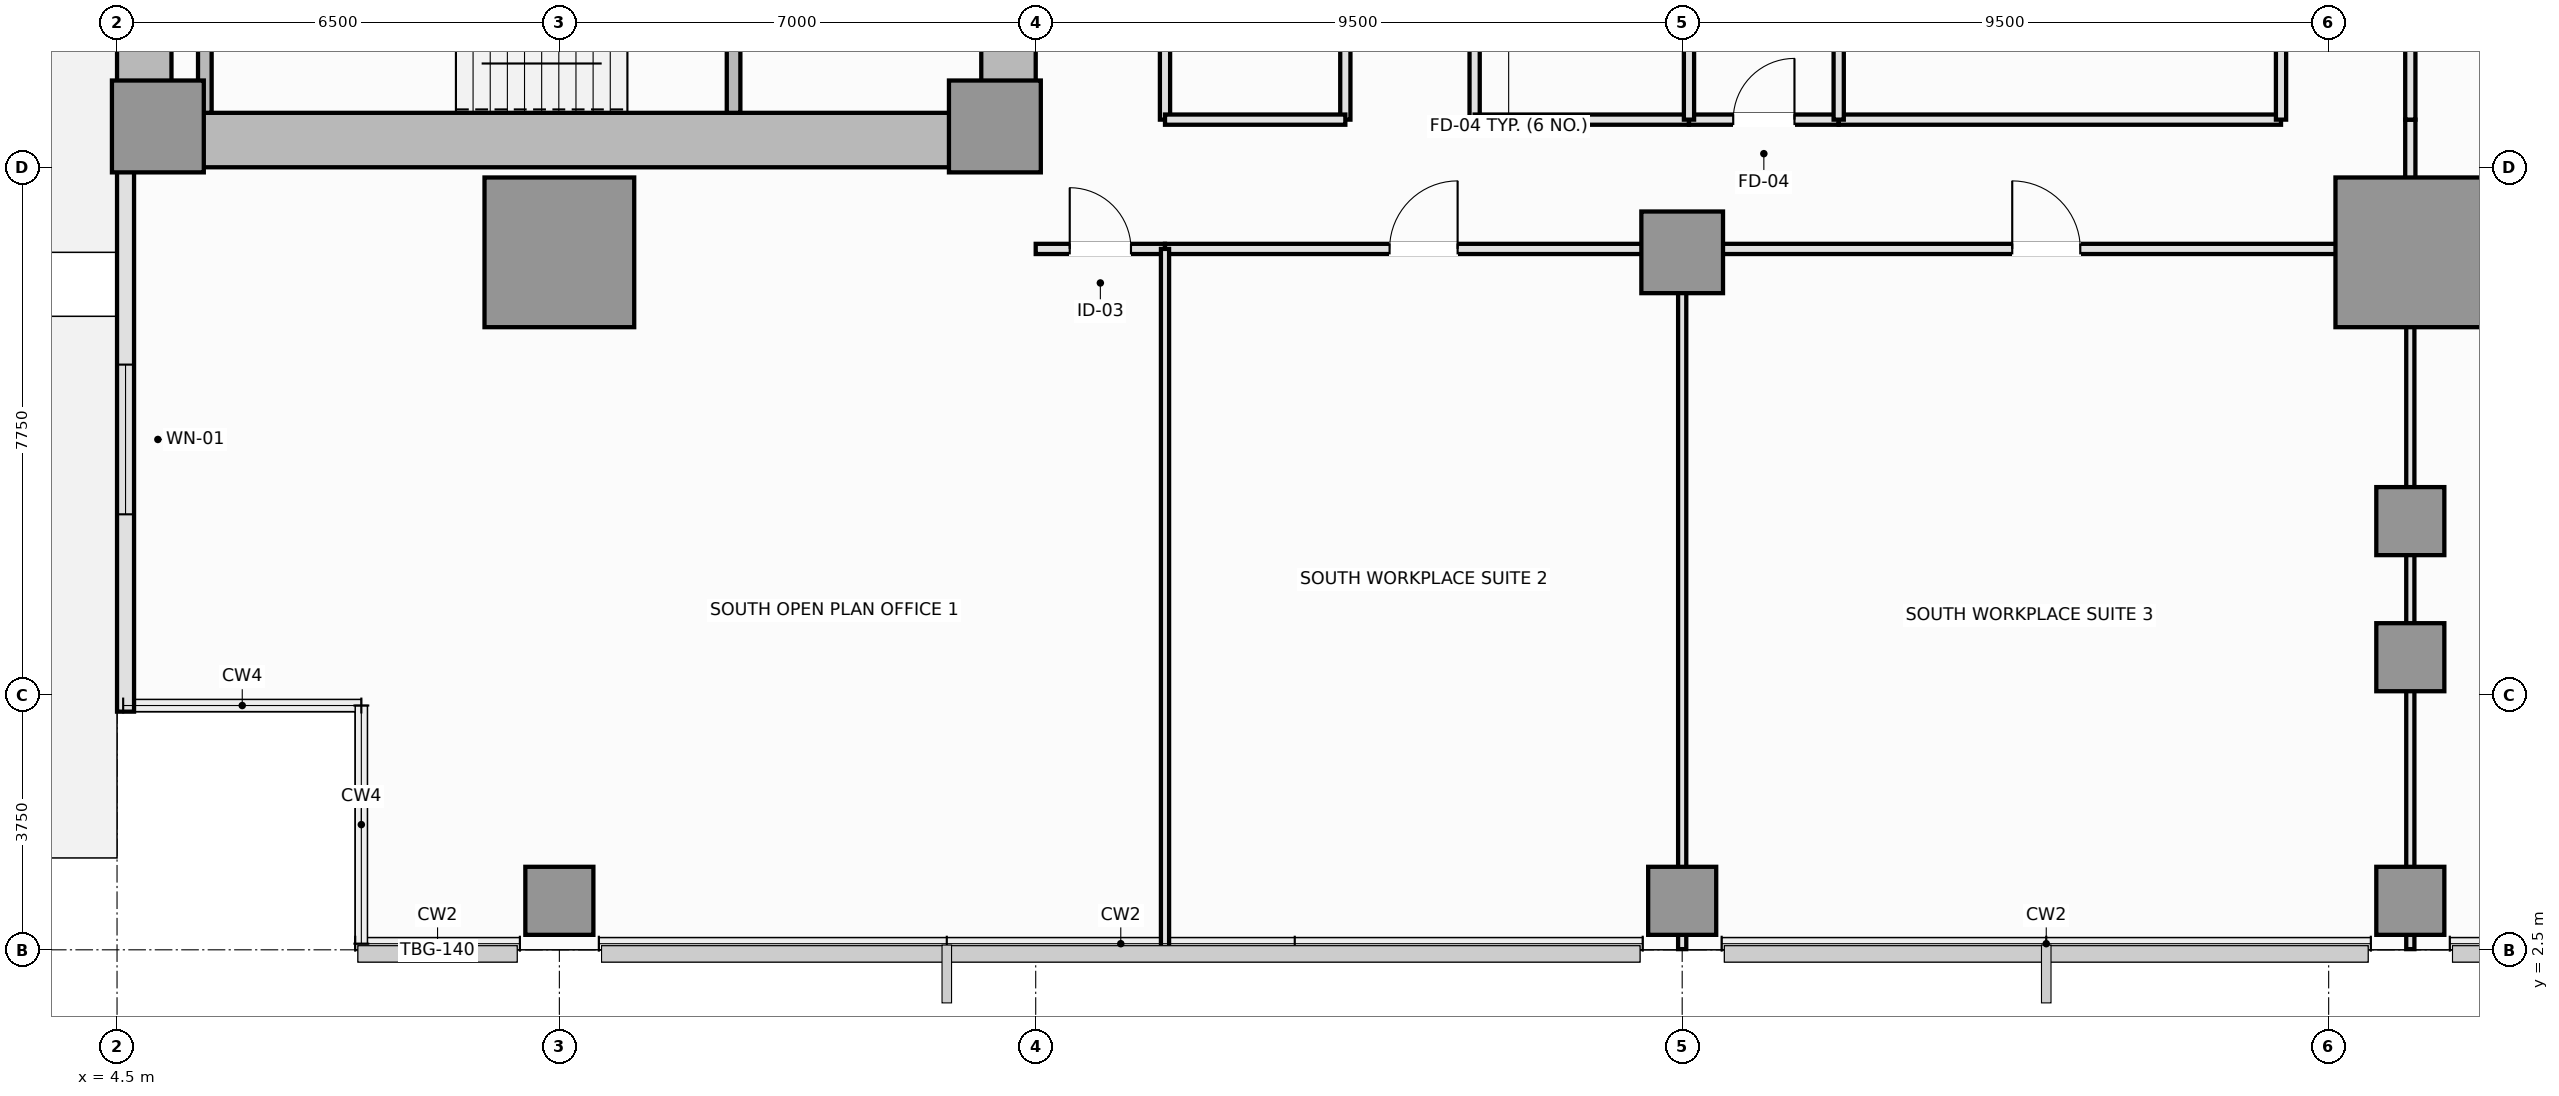
"""IFC4 building model, lengths in metres.
Left out: names, types, materials, properties, quantities, classifications, styles, units other than length and angle.
Written with IfcOpenShell. Run it as: python <this file> out.ifc"""

import sys

from ifc_helpers import new_model, si_unit, direction, frame, frame_2d, origin, origin_2d, place, context, subcontext, project, spatial, rectangle, extrude, element, fill, save


model = new_model("IFC4")
c1 = context("Model", 3, precision=1e-05, world=origin(), true_north=direction((0.0, 1.0)))
c2 = subcontext(c1, "Body", "Model", "MODEL_VIEW")
j1 = project(units=[si_unit("LENGTHUNIT", "METRE"), si_unit("PLANEANGLEUNIT", "RADIAN")], contexts=[c1])
p1 = place(None, origin())
s1 = spatial("IfcSite", under=j1, at=p1, CompositionType="ELEMENT")
p2 = place(p1, origin())
s2 = spatial("IfcBuilding", under=s1, at=p2, CompositionType="ELEMENT")
p3 = place(p2, frame((0.0, 0.0, 25.6)))
s3 = spatial("IfcBuildingStorey", under=s2, at=p3, CompositionType="ELEMENT", Elevation=25.6)
p4 = place(p3, frame((4.5, 14.4, 0.0), z_axis=(0.0, 0.0, 1.0), x_axis=(1.0, 0.0, 0.0)))
e1 = element("IfcWall", 1, at=p4, inside=s3, PredefinedType="SHEAR", context=c2, shape_type="SweptSolid", body=[
    extrude(rectangle(XDim=13.5, YDim=0.8, at=frame_2d((6.75, 0.0))), origin(), (0.0, 0.0, 1.0), 3.55),
])
p5 = place(p3, frame((4.9, 14.8, 0.0), z_axis=(0.0, 0.0, 1.0), x_axis=(0.0, 1.0, 0.0)))
e2 = element("IfcWall", 2, at=p5, inside=s3, PredefinedType="SHEAR", context=c2, shape_type="SweptSolid", body=[
    extrude(rectangle(XDim=20.9, YDim=0.8, at=frame_2d((10.45, 0.0))), origin(), (0.0, 0.0, 1.0), 3.55),
])
p6 = place(p3, frame((17.6, 14.8, 0.0), z_axis=(0.0, 0.0, 1.0), x_axis=(0.0, 1.0, 0.0)))
e3 = element("IfcWall", 3, at=p6, inside=s3, PredefinedType="SHEAR", context=c2, shape_type="SweptSolid", body=[
    extrude(rectangle(XDim=8.65, YDim=0.8, at=frame_2d((4.325, 0.0))), origin(), (0.0, 0.0, 1.0), 3.55),
])
p7 = place(p6, frame((4.1, 0.0, 0.0)))
e4 = element("IfcOpeningElement", 4, at=p7, cuts=e3, PredefinedType="OPENING", context=c2, shape_type="SweptSolid", body=[
    extrude(rectangle(XDim=1.1, YDim=2.15, at=frame_2d((0.55, 1.075))), frame((0.0, 0.41, 0.0), z_axis=(0.0, -1.0, 0.0), x_axis=(1.0, 0.0, 0.0)), (0.0, 0.0, 1.0), 0.82),
])
for number, where, z_axis, x_axis in (
    (5, (5.1, 14.6, 0.0), (0.0, 0.0, 1.0), (1.0, 0.0, 0.0)),
    (6, (17.4, 14.6, 0.0), (0.0, 0.0, 1.0), (1.0, 0.0, 0.0)),
):
    element("IfcColumn", number, at=place(p3, frame(where, z_axis=z_axis, x_axis=x_axis)), inside=s3, PredefinedType="PILASTER", context=c2, shape_type="SweptSolid", body=[
        extrude(rectangle(XDim=1.35, YDim=1.35, at=origin_2d()), origin(), (0.0, 0.0, 1.0), 3.55),
    ])
for number, where, z_axis, x_axis in (
    (7, (11.0, 12.75, 0.0), (0.0, 0.0, 1.0), (1.0, 0.0, 0.0)),
    (8, (38.2, 12.75, 0.0), (0.0, 0.0, 1.0), (1.0, 0.0, 0.0)),
):
    element("IfcColumn", number, at=place(p3, frame(where, z_axis=z_axis, x_axis=x_axis)), inside=s3, PredefinedType="COLUMN", context=c2, shape_type="SweptSolid", body=[
        extrude(rectangle(XDim=2.2, YDim=2.2, at=origin_2d()), origin(), (0.0, 0.0, 1.0), 3.55),
    ])
p8 = place(p3, frame((27.5, 12.75, 0.0), z_axis=(0.0, 0.0, 1.0), x_axis=(1.0, 0.0, 0.0)))
e9 = element("IfcColumn", 9, at=p8, inside=s3, PredefinedType="COLUMN", context=c2, shape_type="SweptSolid", body=[
    extrude(rectangle(XDim=1.2, YDim=1.2, at=origin_2d()), origin(), (0.0, 0.0, 1.0), 3.55),
])
for number, where, z_axis, x_axis in (
    (10, (38.2, 6.8, 0.0), (0.0, 0.0, 1.0), (1.0, 0.0, 0.0)),
    (11, (38.2, 8.8, 0.0), (0.0, 0.0, 1.0), (1.0, 0.0, 0.0)),
    (12, (11.0, 3.22, 0.0), (0.0, 0.0, 1.0), (1.0, 0.0, 0.0)),
    (13, (27.5, 3.22, 0.0), (0.0, 0.0, 1.0), (1.0, 0.0, 0.0)),
    (14, (38.2, 3.22, 0.0), (0.0, 0.0, 1.0), (1.0, 0.0, 0.0)),
):
    element("IfcColumn", number, at=place(p3, frame(where, z_axis=z_axis, x_axis=x_axis)), inside=s3, PredefinedType="COLUMN", context=c2, shape_type="SweptSolid", body=[
        extrude(rectangle(XDim=1.0, YDim=1.0, at=origin_2d()), origin(), (0.0, 0.0, 1.0), 3.55),
    ])
p9 = place(p3, frame((4.625, 14.0, 0.0), z_axis=(0.0, 0.0, 1.0), x_axis=(0.0, -1.0, 0.0)))
e15 = element("IfcWall", 15, at=p9, inside=s3, PredefinedType="SOLIDWALL", context=c2, shape_type="SweptSolid", body=[
    extrude(rectangle(XDim=8.0, YDim=0.25, at=frame_2d((4.0, 0.0))), origin(), (0.0, 0.0, 1.0), 3.37),
])
p10 = place(p9, frame((2.9, 0.0, 0.9)))
e16 = element("IfcOpeningElement", 16, at=p10, cuts=e15, PredefinedType="OPENING", context=c2, shape_type="SweptSolid", body=[
    extrude(rectangle(XDim=2.2, YDim=1.8, at=frame_2d((1.1, 0.9))), frame((0.0, 0.135, 0.0), z_axis=(0.0, -1.0, 0.0), x_axis=(1.0, 0.0, 0.0)), (0.0, 0.0, 1.0), 0.27),
])
p11 = place(p3, frame((5.79, 14.8, 0.0), z_axis=(0.0, 0.0, 1.0), x_axis=(0.0, 1.0, 0.0)))
e17 = element("IfcWall", 17, at=p11, inside=s3, PredefinedType="SOLIDWALL", context=c2, shape_type="SweptSolid", body=[
    extrude(rectangle(XDim=3.05, YDim=0.2, at=frame_2d((1.525, 0.0))), origin(), (0.0, 0.0, 1.0), 3.55),
])
p12 = place(p3, frame((13.56, 14.8, 0.0), z_axis=(0.0, 0.0, 1.0), x_axis=(0.0, 1.0, 0.0)))
e18 = element("IfcWall", 18, at=p12, inside=s3, PredefinedType="SOLIDWALL", context=c2, shape_type="SweptSolid", body=[
    extrude(rectangle(XDim=3.05, YDim=0.2, at=frame_2d((1.525, 0.0))), origin(), (0.0, 0.0, 1.0), 3.55),
])
p13 = place(p12, frame((0.95, 0.0, 0.0)))
e19 = element("IfcOpeningElement", 19, at=p13, cuts=e18, PredefinedType="OPENING", context=c2, shape_type="SweptSolid", body=[
    extrude(rectangle(XDim=1.15, YDim=2.15, at=frame_2d((0.575, 1.075))), frame((0.0, 0.11, 0.0), z_axis=(0.0, -1.0, 0.0), x_axis=(1.0, 0.0, 0.0)), (0.0, 0.0, 1.0), 0.22),
])
p14 = place(p3, frame((22.55, 14.7, 0.0), z_axis=(0.0, 0.0, 1.0), x_axis=(0.0, 1.0, 0.0)))
e20 = element("IfcWall", 20, at=p14, inside=s3, PredefinedType="PARTITIONING", context=c2, shape_type="SweptSolid", body=[
    extrude(rectangle(XDim=3.03, YDim=0.15, at=frame_2d((1.515, 0.0))), origin(), (0.0, 0.0, 1.0), 3.01),
])
p15 = place(p14, frame((1.015, 0.0, 0.0)))
e21 = element("IfcOpeningElement", 21, at=p15, cuts=e20, PredefinedType="OPENING", context=c2, shape_type="SweptSolid", body=[
    extrude(rectangle(XDim=1.0, YDim=2.15, at=frame_2d((0.5, 1.075))), frame((0.0, 0.085, 0.0), z_axis=(0.0, -1.0, 0.0), x_axis=(1.0, 0.0, 0.0)), (0.0, 0.0, 1.0), 0.17),
])
p16 = place(p3, frame((24.45, 14.7, 0.0), z_axis=(0.0, 0.0, 1.0), x_axis=(0.0, 1.0, 0.0)))
e22 = element("IfcWall", 22, at=p16, inside=s3, PredefinedType="PLUMBINGWALL", context=c2, shape_type="SweptSolid", body=[
    extrude(rectangle(XDim=3.1, YDim=0.15, at=frame_2d((1.55, 0.0))), origin(), (0.0, 0.0, 1.0), 3.37),
])
p17 = place(p16, frame((1.1, 0.0, 0.0)))
e23 = element("IfcOpeningElement", 23, at=p17, cuts=e22, PredefinedType="OPENING", context=c2, shape_type="SweptSolid", body=[
    extrude(rectangle(XDim=0.9, YDim=2.1, at=frame_2d((0.45, 1.05))), frame((0.0, 0.085, 0.0), z_axis=(0.0, -1.0, 0.0), x_axis=(1.0, 0.0, 0.0)), (0.0, 0.0, 1.0), 0.17),
])
p18 = place(p3, frame((19.9, 14.7, 0.0), z_axis=(0.0, 0.0, 1.0), x_axis=(0.0, 1.0, 0.0)))
e24 = element("IfcWall", 24, at=p18, inside=s3, PredefinedType="PARTITIONING", context=c2, shape_type="SweptSolid", body=[
    extrude(rectangle(XDim=3.03, YDim=0.15, at=frame_2d((1.515, 0.0))), origin(), (0.0, 0.0, 1.0), 3.37),
])
p19 = place(p3, frame((19.9, 14.7, 0.0), z_axis=(0.0, 0.0, 1.0), x_axis=(1.0, 0.0, 0.0)))
e25 = element("IfcWall", 25, at=p19, inside=s3, PredefinedType="PARTITIONING", context=c2, shape_type="SweptSolid", body=[
    extrude(rectangle(XDim=2.65, YDim=0.15, at=frame_2d((1.325, 0.0))), origin(), (0.0, 0.0, 1.0), 3.37),
])
p20 = place(p3, frame((24.45, 14.7, 0.0), z_axis=(0.0, 0.0, 1.0), x_axis=(1.0, 0.0, 0.0)))
e26 = element("IfcWall", 26, at=p20, inside=s3, PredefinedType="PLUMBINGWALL", context=c2, shape_type="SweptSolid", body=[
    extrude(rectangle(XDim=3.15, YDim=0.15, at=frame_2d((1.575, 0.0))), origin(), (0.0, 0.0, 1.0), 3.37),
])
p21 = place(p3, frame((27.6, 14.7, 0.0), z_axis=(0.0, 0.0, 1.0), x_axis=(1.0, 0.0, 0.0)))
e27 = element("IfcWall", 27, at=p21, inside=s3, PredefinedType="PLUMBINGWALL", context=c2, shape_type="SweptSolid", body=[
    extrude(rectangle(XDim=2.2, YDim=0.15, at=frame_2d((1.1, 0.0))), origin(), (0.0, 0.0, 1.0), 3.37),
])
p22 = place(p21, frame((0.65, 0.0, 0.0)))
e28 = element("IfcOpeningElement", 28, at=p22, cuts=e27, PredefinedType="OPENING", context=c2, shape_type="SweptSolid", body=[
    extrude(rectangle(XDim=0.9, YDim=2.1, at=frame_2d((0.45, 1.05))), frame((0.0, 0.085, 0.0), z_axis=(0.0, -1.0, 0.0), x_axis=(1.0, 0.0, 0.0)), (0.0, 0.0, 1.0), 0.17),
])
p23 = place(p3, frame((29.8, 14.7, 0.0), z_axis=(0.0, 0.0, 1.0), x_axis=(1.0, 0.0, 0.0)))
e29 = element("IfcWall", 29, at=p23, inside=s3, PredefinedType="PARTITIONING", context=c2, shape_type="SweptSolid", body=[
    extrude(rectangle(XDim=6.5, YDim=0.15, at=frame_2d((3.25, 0.0))), origin(), (0.0, 0.0, 1.0), 3.37),
])
p24 = place(p3, frame((18.0, 12.8, 0.0), z_axis=(0.0, 0.0, 1.0), x_axis=(1.0, 0.0, 0.0)))
e30 = element("IfcWall", 30, at=p24, inside=s3, PredefinedType="PARTITIONING", context=c2, shape_type="SweptSolid", body=[
    extrude(rectangle(XDim=1.9, YDim=0.15, at=frame_2d((0.95, 0.0))), origin(), (0.0, 0.0, 1.0), 2.72),
])
p25 = place(p24, frame((0.5, 0.0, 0.0)))
e31 = element("IfcOpeningElement", 31, at=p25, cuts=e30, PredefinedType="OPENING", context=c2, shape_type="SweptSolid", body=[
    extrude(rectangle(XDim=0.9, YDim=2.1, at=frame_2d((0.45, 1.05))), frame((0.0, 0.085, 0.0), z_axis=(0.0, -1.0, 0.0), x_axis=(1.0, 0.0, 0.0)), (0.0, 0.0, 1.0), 0.17),
])
p26 = place(p3, frame((19.9, 12.8, 0.0), z_axis=(0.0, 0.0, 1.0), x_axis=(1.0, 0.0, 0.0)))
e32 = element("IfcWall", 32, at=p26, inside=s3, PredefinedType="PARTITIONING", context=c2, shape_type="SweptSolid", body=[
    extrude(rectangle(XDim=7.6, YDim=0.15, at=frame_2d((3.8, 0.0))), origin(), (0.0, 0.0, 1.0), 2.72),
])
p27 = place(p26, frame((3.3, 0.0, 0.0)))
e33 = element("IfcOpeningElement", 33, at=p27, cuts=e32, PredefinedType="OPENING", context=c2, shape_type="SweptSolid", body=[
    extrude(rectangle(XDim=1.0, YDim=2.15, at=frame_2d((0.5, 1.075))), frame((0.0, 0.085, 0.0), z_axis=(0.0, -1.0, 0.0), x_axis=(1.0, 0.0, 0.0)), (0.0, 0.0, 1.0), 0.17),
])
p28 = place(p3, frame((27.5, 12.8, 0.0), z_axis=(0.0, 0.0, 1.0), x_axis=(1.0, 0.0, 0.0)))
e34 = element("IfcWall", 34, at=p28, inside=s3, PredefinedType="PARTITIONING", context=c2, shape_type="SweptSolid", body=[
    extrude(rectangle(XDim=10.7, YDim=0.15, at=frame_2d((5.35, 0.0))), origin(), (0.0, 0.0, 1.0), 2.72),
])
p29 = place(p28, frame((4.85, 0.0, 0.0)))
e35 = element("IfcOpeningElement", 35, at=p29, cuts=e34, PredefinedType="OPENING", context=c2, shape_type="SweptSolid", body=[
    extrude(rectangle(XDim=1.0, YDim=2.15, at=frame_2d((0.5, 1.075))), frame((0.0, 0.085, 0.0), z_axis=(0.0, -1.0, 0.0), x_axis=(1.0, 0.0, 0.0)), (0.0, 0.0, 1.0), 0.17),
])
p30 = place(p3, frame((38.2, 12.8, 0.0), z_axis=(0.0, 0.0, 1.0), x_axis=(0.0, 1.0, 0.0)))
e36 = element("IfcWall", 36, at=p30, inside=s3, PredefinedType="PARTITIONING", context=c2, shape_type="SweptSolid", body=[
    extrude(rectangle(XDim=1.9, YDim=0.15, at=frame_2d((0.95, 0.0))), origin(), (0.0, 0.0, 1.0), 2.82),
])
p31 = place(p3, frame((36.3, 14.7, 0.0), z_axis=(0.0, 0.0, 1.0), x_axis=(0.0, 1.0, 0.0)))
e37 = element("IfcWall", 37, at=p31, inside=s3, PredefinedType="PARTITIONING", context=c2, shape_type="SweptSolid", body=[
    extrude(rectangle(XDim=3.1, YDim=0.15, at=frame_2d((1.55, 0.0))), origin(), (0.0, 0.0, 1.0), 3.37),
])
p32 = place(p31, frame((1.05, 0.0, 0.0)))
e38 = element("IfcOpeningElement", 38, at=p32, cuts=e37, PredefinedType="OPENING", context=c2, shape_type="SweptSolid", body=[
    extrude(rectangle(XDim=1.0, YDim=2.15, at=frame_2d((0.5, 1.075))), frame((0.0, 0.085, 0.0), z_axis=(0.0, -1.0, 0.0), x_axis=(1.0, 0.0, 0.0)), (0.0, 0.0, 1.0), 0.17),
])
p33 = place(p3, frame((38.2, 14.7, 0.0), z_axis=(0.0, 0.0, 1.0), x_axis=(0.0, 1.0, 0.0)))
e39 = element("IfcWall", 39, at=p33, inside=s3, PredefinedType="PARTITIONING", context=c2, shape_type="SweptSolid", body=[
    extrude(rectangle(XDim=3.8, YDim=0.15, at=frame_2d((1.9, 0.0))), origin(), (0.0, 0.0, 1.0), 2.82),
])
p34 = place(p33, frame((1.4, 0.0, 0.0)))
e40 = element("IfcOpeningElement", 40, at=p34, cuts=e39, PredefinedType="OPENING", context=c2, shape_type="SweptSolid", body=[
    extrude(rectangle(XDim=1.0, YDim=2.15, at=frame_2d((0.5, 1.075))), frame((0.0, 0.085, 0.0), z_axis=(0.0, -1.0, 0.0), x_axis=(1.0, 0.0, 0.0)), (0.0, 0.0, 1.0), 0.17),
])
for number, where, z_axis, x_axis in (
    (41, (27.6, 14.7, 0.0), (0.0, 0.0, 1.0), (0.0, 1.0, 0.0)),
    (42, (29.8, 14.7, 0.0), (0.0, 0.0, 1.0), (0.0, 1.0, 0.0)),
):
    element("IfcWall", number, at=place(p3, frame(where, z_axis=z_axis, x_axis=x_axis)), inside=s3, PredefinedType="PLUMBINGWALL", context=c2, shape_type="SweptSolid", body=[
        extrude(rectangle(XDim=3.1, YDim=0.15, at=frame_2d((1.55, 0.0))), origin(), (0.0, 0.0, 1.0), 3.37),
    ])
p35 = place(p3, frame((19.9, 2.51, 0.0), z_axis=(0.0, 0.0, 1.0), x_axis=(0.0, 1.0, 0.0)))
e43 = element("IfcWall", 43, at=p35, inside=s3, PredefinedType="PARTITIONING", context=c2, shape_type="SweptSolid", body=[
    extrude(rectangle(XDim=10.29, YDim=0.12, at=frame_2d((5.145, 0.0))), origin(), (0.0, 0.0, 1.0), 3.37),
])
for number, where, z_axis, x_axis in (
    (44, (27.5, 2.51, 0.0), (0.0, 0.0, 1.0), (0.0, 1.0, 0.0)),
    (45, (38.2, 2.51, 0.0), (0.0, 0.0, 1.0), (0.0, 1.0, 0.0)),
):
    element("IfcWall", number, at=place(p3, frame(where, z_axis=z_axis, x_axis=x_axis)), inside=s3, PredefinedType="PARTITIONING", context=c2, shape_type="SweptSolid", body=[
        extrude(rectangle(XDim=10.29, YDim=0.12, at=frame_2d((5.145, 0.0))), origin(), (0.0, 0.0, 1.0), 2.82),
    ])
p36 = place(p10, origin())
e46 = element("IfcWindow", 46, at=p36, inside=s3, PartitioningType="SINGLE_PANEL", PredefinedType="WINDOW", context=c2, shape_type="SweptSolid", body=[
    extrude(rectangle(XDim=2.2, YDim=1.8, at=frame_2d((1.1, 0.9))), frame((0.0, 0.03, 0.0), z_axis=(0.0, -1.0, 0.0), x_axis=(1.0, 0.0, 0.0)), (0.0, 0.0, 1.0), 0.06),
])
fill(e16, e46)
p37 = place(p22, origin())
e47 = element("IfcDoor", 47, at=p37, inside=s3, OperationType="SINGLE_SWING_RIGHT", PredefinedType="DOOR", context=c2, shape_type="SweptSolid", body=[
    extrude(rectangle(XDim=0.9, YDim=2.1, at=frame_2d((0.45, 1.05))), frame((0.0, 0.025, 0.0), z_axis=(0.0, -1.0, 0.0), x_axis=(1.0, 0.0, 0.0)), (0.0, 0.0, 1.0), 0.05),
])
fill(e28, e47)
p38 = place(p25, origin())
e48 = element("IfcDoor", 48, at=p38, inside=s3, OperationType="SINGLE_SWING_LEFT", PredefinedType="DOOR", context=c2, shape_type="SweptSolid", body=[
    extrude(rectangle(XDim=0.9, YDim=2.1, at=frame_2d((0.45, 1.05))), frame((0.0, 0.025, 0.0), z_axis=(0.0, -1.0, 0.0), x_axis=(1.0, 0.0, 0.0)), (0.0, 0.0, 1.0), 0.05),
])
fill(e31, e48)
p39 = place(p27, origin())
e49 = element("IfcDoor", 49, at=p39, inside=s3, OperationType="SINGLE_SWING_RIGHT", PredefinedType="DOOR", context=c2, shape_type="SweptSolid", body=[
    extrude(rectangle(XDim=1.0, YDim=2.15, at=frame_2d((0.5, 1.075))), frame((0.0, 0.025, 0.0), z_axis=(0.0, -1.0, 0.0), x_axis=(1.0, 0.0, 0.0)), (0.0, 0.0, 1.0), 0.05),
])
fill(e33, e49)
p40 = place(p29, origin())
e50 = element("IfcDoor", 50, at=p40, inside=s3, OperationType="SINGLE_SWING_LEFT", PredefinedType="DOOR", context=c2, shape_type="SweptSolid", body=[
    extrude(rectangle(XDim=1.0, YDim=2.15, at=frame_2d((0.5, 1.075))), frame((0.0, 0.025, 0.0), z_axis=(0.0, -1.0, 0.0), x_axis=(1.0, 0.0, 0.0)), (0.0, 0.0, 1.0), 0.05),
])
fill(e35, e50)
save(model, sys.argv[1])
